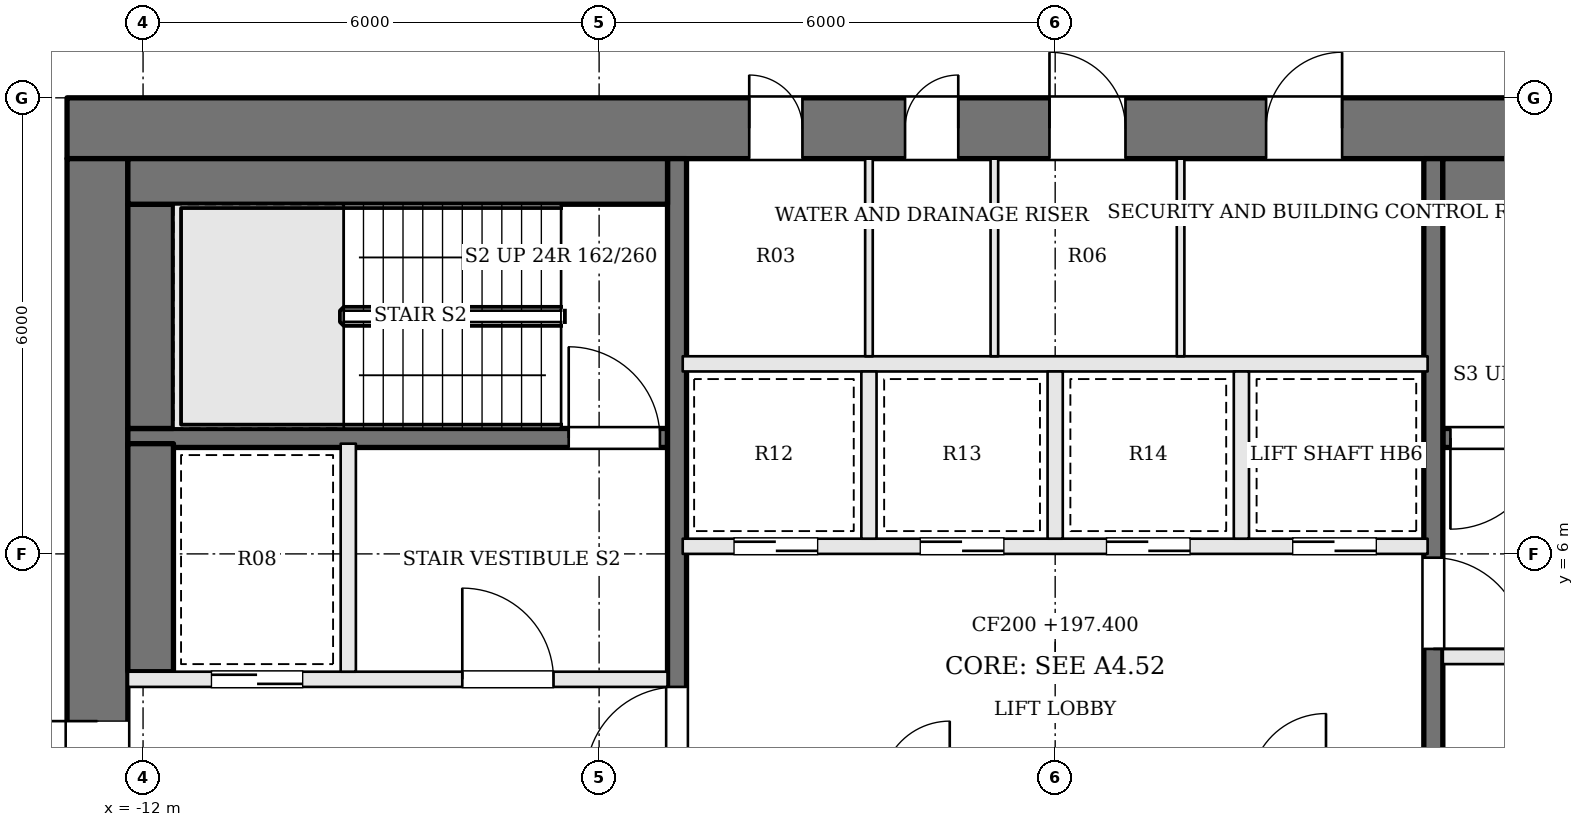
"""IFC4 building model, lengths in metres.
Left out: names, types, materials, properties, quantities, classifications, styles, units other than length and angle.
Written with IfcOpenShell. Run it as: python <this file> out.ifc"""

import sys

from ifc_helpers import new_model, si_unit, direction, frame, frame_2d, origin, place, context, subcontext, project, spatial, rectangle, extrude, element, fill, save


model = new_model("IFC4")
c1 = context("Model", 3, precision=1e-05, world=origin(), true_north=direction((0.0, 1.0)))
c2 = subcontext(c1, "Body", "Model", "MODEL_VIEW")
j1 = project(units=[si_unit("LENGTHUNIT", "METRE"), si_unit("PLANEANGLEUNIT", "RADIAN")], contexts=[c1])
p1 = place(None, origin())
s1 = spatial("IfcSite", under=j1, at=p1, CompositionType="ELEMENT")
p2 = place(p1, origin())
s2 = spatial("IfcBuilding", under=s1, at=p2, CompositionType="ELEMENT")
p3 = place(p2, frame((0.0, 0.0, 197.4)))
s3 = spatial("IfcBuildingStorey", under=s2, at=p3, CompositionType="ELEMENT", Elevation=197.4)
p4 = place(p3, frame((-13.0, 11.6, 0.0), z_axis=(0.0, 0.0, 1.0), x_axis=(1.0, 0.0, 0.0)))
e1 = element("IfcWall", 1, at=p4, inside=s3, PredefinedType="SHEAR", context=c2, shape_type="SweptSolid", body=[
    extrude(rectangle(XDim=26.0, YDim=0.8, at=frame_2d((13.0, 0.0))), origin(), (0.0, 0.0, 1.0), 3.9),
])
p5 = place(p4, frame((8.975, 0.0, 0.0)))
e2 = element("IfcOpeningElement", 2, at=p5, cuts=e1, PredefinedType="OPENING", context=c2, shape_type="SweptSolid", body=[
    extrude(rectangle(XDim=0.7, YDim=2.1, at=frame_2d((0.35, 1.05))), frame((0.0, 0.41, 0.0), z_axis=(0.0, -1.0, 0.0), x_axis=(1.0, 0.0, 0.0)), (0.0, 0.0, 1.0), 0.82),
])
p6 = place(p4, frame((11.025, 0.0, 0.0)))
e3 = element("IfcOpeningElement", 3, at=p6, cuts=e1, PredefinedType="OPENING", context=c2, shape_type="SweptSolid", body=[
    extrude(rectangle(XDim=0.7, YDim=2.1, at=frame_2d((0.35, 1.05))), frame((0.0, 0.41, 0.0), z_axis=(0.0, -1.0, 0.0), x_axis=(1.0, 0.0, 0.0)), (0.0, 0.0, 1.0), 0.82),
])
p7 = place(p4, frame((12.925, 0.0, 0.0)))
e4 = element("IfcOpeningElement", 4, at=p7, cuts=e1, PredefinedType="OPENING", context=c2, shape_type="SweptSolid", body=[
    extrude(rectangle(XDim=1.0, YDim=2.1, at=frame_2d((0.5, 1.05))), frame((0.0, 0.41, 0.0), z_axis=(0.0, -1.0, 0.0), x_axis=(1.0, 0.0, 0.0)), (0.0, 0.0, 1.0), 0.82),
])
p8 = place(p4, frame((15.775, 0.0, 0.0)))
e5 = element("IfcOpeningElement", 5, at=p8, cuts=e1, PredefinedType="OPENING", context=c2, shape_type="SweptSolid", body=[
    extrude(rectangle(XDim=1.0, YDim=2.1, at=frame_2d((0.5, 1.05))), frame((0.0, 0.41, 0.0), z_axis=(0.0, -1.0, 0.0), x_axis=(1.0, 0.0, 0.0)), (0.0, 0.0, 1.0), 0.82),
])
p9 = place(p3, frame((-12.6, -2.2, 0.0), z_axis=(0.0, 0.0, 1.0), x_axis=(0.0, 1.0, 0.0)))
e6 = element("IfcWall", 6, at=p9, inside=s3, PredefinedType="SHEAR", context=c2, shape_type="SweptSolid", body=[
    extrude(rectangle(XDim=13.4, YDim=0.8, at=frame_2d((6.7, 0.0))), origin(), (0.0, 0.0, 1.0), 3.9),
])
p10 = place(p9, frame((4.2, 0.0, 0.0)))
e7 = element("IfcOpeningElement", 7, at=p10, cuts=e6, PredefinedType="OPENING", context=c2, shape_type="SweptSolid", body=[
    extrude(rectangle(XDim=1.8, YDim=2.1, at=frame_2d((0.9, 1.05))), frame((0.0, 0.41, 0.0), z_axis=(0.0, -1.0, 0.0), x_axis=(1.0, 0.0, 0.0)), (0.0, 0.0, 1.0), 0.82),
])
p11 = place(p3, frame((12.2, 7.525, 0.0), z_axis=(0.0, 0.0, 1.0), x_axis=(-1.0, 0.0, 0.0)))
e8 = element("IfcWall", 8, at=p11, inside=s3, PredefinedType="SOLIDWALL", context=c2, shape_type="SweptSolid", body=[
    extrude(rectangle(XDim=7.1, YDim=0.25, at=frame_2d((3.55, 0.0))), origin(), (0.0, 0.0, 1.0), 3.7),
])
p12 = place(p11, frame((5.8, 0.0, 0.0)))
e9 = element("IfcOpeningElement", 9, at=p12, cuts=e8, PredefinedType="OPENING", context=c2, shape_type="SweptSolid", body=[
    extrude(rectangle(XDim=1.2, YDim=2.1, at=frame_2d((0.6, 1.05))), frame((0.0, 0.135, 0.0), z_axis=(0.0, -1.0, 0.0), x_axis=(1.0, 0.0, 0.0)), (0.0, 0.0, 1.0), 0.27),
])
p13 = place(p3, frame((-12.2, 4.35, 0.0), z_axis=(0.0, 0.0, 1.0), x_axis=(1.0, 0.0, 0.0)))
e10 = element("IfcWall", 10, at=p13, inside=s3, PredefinedType="SOLIDWALL", context=c2, shape_type="SweptSolid", body=[
    extrude(rectangle(XDim=7.1, YDim=0.2, at=frame_2d((3.55, 0.0))), origin(), (0.0, 0.0, 1.0), 3.7),
])
p14 = place(p13, frame((4.4, 0.0, 0.0)))
e11 = element("IfcOpeningElement", 11, at=p14, cuts=e10, PredefinedType="OPENING", context=c2, shape_type="SweptSolid", body=[
    extrude(rectangle(XDim=1.2, YDim=2.1, at=frame_2d((0.6, 1.05))), frame((0.0, 0.11, 0.0), z_axis=(0.0, -1.0, 0.0), x_axis=(1.0, 0.0, 0.0)), (0.0, 0.0, 1.0), 0.22),
])
p15 = place(p13, frame((1.1, 0.0, 0.0)))
e12 = element("IfcOpeningElement", 12, at=p15, cuts=e10, PredefinedType="OPENING", context=c2, shape_type="SweptSolid", body=[
    extrude(rectangle(XDim=1.2, YDim=2.1, at=frame_2d((0.6, 1.05))), frame((0.0, 0.11, 0.0), z_axis=(0.0, -1.0, 0.0), x_axis=(1.0, 0.0, 0.0)), (0.0, 0.0, 1.0), 0.22),
])
p16 = place(p3, frame((12.2, 4.65, 0.0), z_axis=(0.0, 0.0, 1.0), x_axis=(-1.0, 0.0, 0.0)))
e13 = element("IfcWall", 13, at=p16, inside=s3, PredefinedType="SOLIDWALL", context=c2, shape_type="SweptSolid", body=[
    extrude(rectangle(XDim=7.1, YDim=0.2, at=frame_2d((3.55, 0.0))), origin(), (0.0, 0.0, 1.0), 3.7),
])
p17 = place(p16, frame((4.4, 0.0, 0.0)))
e14 = element("IfcOpeningElement", 14, at=p17, cuts=e13, PredefinedType="OPENING", context=c2, shape_type="SweptSolid", body=[
    extrude(rectangle(XDim=1.2, YDim=2.1, at=frame_2d((0.6, 1.05))), frame((0.0, 0.11, 0.0), z_axis=(0.0, -1.0, 0.0), x_axis=(1.0, 0.0, 0.0)), (0.0, 0.0, 1.0), 0.22),
])
p18 = place(p16, frame((1.1, 0.0, 0.0)))
e15 = element("IfcOpeningElement", 15, at=p18, cuts=e13, PredefinedType="OPENING", context=c2, shape_type="SweptSolid", body=[
    extrude(rectangle(XDim=1.2, YDim=2.1, at=frame_2d((0.6, 1.05))), frame((0.0, 0.11, 0.0), z_axis=(0.0, -1.0, 0.0), x_axis=(1.0, 0.0, 0.0)), (0.0, 0.0, 1.0), 0.22),
])
p19 = place(p3, frame((-12.2, 7.525, 0.0), z_axis=(0.0, 0.0, 1.0), x_axis=(1.0, 0.0, 0.0)))
e16 = element("IfcWall", 16, at=p19, inside=s3, PredefinedType="SOLIDWALL", context=c2, shape_type="SweptSolid", body=[
    extrude(rectangle(XDim=7.1, YDim=0.25, at=frame_2d((3.55, 0.0))), origin(), (0.0, 0.0, 1.0), 3.7),
])
p20 = place(p19, frame((5.8, 0.0, 0.0)))
e17 = element("IfcOpeningElement", 17, at=p20, cuts=e16, PredefinedType="OPENING", context=c2, shape_type="SweptSolid", body=[
    extrude(rectangle(XDim=1.2, YDim=2.1, at=frame_2d((0.6, 1.05))), frame((0.0, 0.135, 0.0), z_axis=(0.0, -1.0, 0.0), x_axis=(1.0, 0.0, 0.0)), (0.0, 0.0, 1.0), 0.27),
])
p21 = place(p3, frame((-9.3, 4.45, 0.0), z_axis=(0.0, 0.0, 1.0), x_axis=(0.0, 1.0, 0.0)))
e18 = element("IfcWall", 18, at=p21, inside=s3, PredefinedType="SOLIDWALL", context=c2, shape_type="SweptSolid", body=[
    extrude(rectangle(XDim=3.0, YDim=0.2, at=frame_2d((1.5, 0.0))), origin(), (0.0, 0.0, 1.0), 3.7),
])
p22 = place(p3, frame((-4.975, -2.2, 0.0), z_axis=(0.0, 0.0, 1.0), x_axis=(0.0, 1.0, 0.0)))
e19 = element("IfcWall", 19, at=p22, inside=s3, PredefinedType="SOLIDWALL", context=c2, shape_type="SweptSolid", body=[
    extrude(rectangle(XDim=13.4, YDim=0.25, at=frame_2d((6.7, 0.0))), origin(), (0.0, 0.0, 1.0), 3.7),
])
p23 = place(p22, frame((5.25, 0.0, 0.0)))
e20 = element("IfcOpeningElement", 20, at=p23, cuts=e19, PredefinedType="OPENING", context=c2, shape_type="SweptSolid", body=[
    extrude(rectangle(XDim=1.2, YDim=2.1, at=frame_2d((0.6, 1.05))), frame((0.0, 0.135, 0.0), z_axis=(0.0, -1.0, 0.0), x_axis=(1.0, 0.0, 0.0)), (0.0, 0.0, 1.0), 0.27),
])
p24 = place(p3, frame((4.975, 11.2, 0.0), z_axis=(0.0, 0.0, 1.0), x_axis=(0.0, -1.0, 0.0)))
e21 = element("IfcWall", 21, at=p24, inside=s3, PredefinedType="SOLIDWALL", context=c2, shape_type="SweptSolid", body=[
    extrude(rectangle(XDim=13.4, YDim=0.25, at=frame_2d((6.7, 0.0))), origin(), (0.0, 0.0, 1.0), 3.7),
])
p25 = place(p24, frame((5.25, 0.0, 0.0)))
e22 = element("IfcOpeningElement", 22, at=p25, cuts=e21, PredefinedType="OPENING", context=c2, shape_type="SweptSolid", body=[
    extrude(rectangle(XDim=1.2, YDim=2.1, at=frame_2d((0.6, 1.05))), frame((0.0, 0.135, 0.0), z_axis=(0.0, -1.0, 0.0), x_axis=(1.0, 0.0, 0.0)), (0.0, 0.0, 1.0), 0.27),
])
p26 = place(p3, frame((-11.9, 4.45, 0.0), z_axis=(0.0, 0.0, 1.0), x_axis=(0.0, 1.0, 0.0)))
e23 = element("IfcWall", 23, at=p26, inside=s3, PredefinedType="SOLIDWALL", context=c2, shape_type="SweptSolid", body=[
    extrude(rectangle(XDim=3.0, YDim=0.6, at=frame_2d((1.5, 0.0))), origin(), (0.0, 0.0, 1.0), 3.7),
])
p27 = place(p3, frame((-11.9, 7.65, 0.0), z_axis=(0.0, 0.0, 1.0), x_axis=(0.0, 1.0, 0.0)))
e24 = element("IfcWall", 24, at=p27, inside=s3, PredefinedType="SOLIDWALL", context=c2, shape_type="SweptSolid", body=[
    extrude(rectangle(XDim=2.95, YDim=0.6, at=frame_2d((1.475, 0.0))), origin(), (0.0, 0.0, 1.0), 3.7),
])
for number, where, z_axis, x_axis in (
    (25, (-12.2, 10.9, 0.0), (0.0, 0.0, 1.0), (1.0, 0.0, 0.0)),
    (26, (12.2, 10.9, 0.0), (0.0, 0.0, 1.0), (-1.0, 0.0, 0.0)),
):
    element("IfcWall", number, at=place(p3, frame(where, z_axis=z_axis, x_axis=x_axis)), inside=s3, PredefinedType="SOLIDWALL", context=c2, shape_type="SweptSolid", body=[
        extrude(rectangle(XDim=7.1, YDim=0.6, at=frame_2d((3.55, 0.0))), origin(), (0.0, 0.0, 1.0), 3.7),
    ])
p28 = place(p3, frame((-4.9, 6.1, 0.0), z_axis=(0.0, 0.0, 1.0), x_axis=(1.0, 0.0, 0.0)))
e27 = element("IfcWall", 27, at=p28, inside=s3, PredefinedType="SOLIDWALL", context=c2, shape_type="SweptSolid", body=[
    extrude(rectangle(XDim=9.8, YDim=0.2, at=frame_2d((4.9, 0.0))), origin(), (0.0, 0.0, 1.0), 3.7),
])
p29 = place(p28, frame((0.675, 0.0, 0.0)))
e28 = element("IfcOpeningElement", 28, at=p29, cuts=e27, PredefinedType="OPENING", context=c2, shape_type="SweptSolid", body=[
    extrude(rectangle(XDim=1.1, YDim=2.1, at=frame_2d((0.55, 1.05))), frame((0.0, 0.11, 0.0), z_axis=(0.0, -1.0, 0.0), x_axis=(1.0, 0.0, 0.0)), (0.0, 0.0, 1.0), 0.22),
])
p30 = place(p28, frame((3.125, 0.0, 0.0)))
e29 = element("IfcOpeningElement", 29, at=p30, cuts=e27, PredefinedType="OPENING", context=c2, shape_type="SweptSolid", body=[
    extrude(rectangle(XDim=1.1, YDim=2.1, at=frame_2d((0.55, 1.05))), frame((0.0, 0.11, 0.0), z_axis=(0.0, -1.0, 0.0), x_axis=(1.0, 0.0, 0.0)), (0.0, 0.0, 1.0), 0.22),
])
p31 = place(p28, frame((5.575, 0.0, 0.0)))
e30 = element("IfcOpeningElement", 30, at=p31, cuts=e27, PredefinedType="OPENING", context=c2, shape_type="SweptSolid", body=[
    extrude(rectangle(XDim=1.1, YDim=2.1, at=frame_2d((0.55, 1.05))), frame((0.0, 0.11, 0.0), z_axis=(0.0, -1.0, 0.0), x_axis=(1.0, 0.0, 0.0)), (0.0, 0.0, 1.0), 0.22),
])
p32 = place(p28, frame((8.025, 0.0, 0.0)))
e31 = element("IfcOpeningElement", 31, at=p32, cuts=e27, PredefinedType="OPENING", context=c2, shape_type="SweptSolid", body=[
    extrude(rectangle(XDim=1.1, YDim=2.1, at=frame_2d((0.55, 1.05))), frame((0.0, 0.11, 0.0), z_axis=(0.0, -1.0, 0.0), x_axis=(1.0, 0.0, 0.0)), (0.0, 0.0, 1.0), 0.22),
])
p33 = place(p3, frame((-4.9, 8.5, 0.0), z_axis=(0.0, 0.0, 1.0), x_axis=(1.0, 0.0, 0.0)))
e32 = element("IfcWall", 32, at=p33, inside=s3, PredefinedType="SOLIDWALL", context=c2, shape_type="SweptSolid", body=[
    extrude(rectangle(XDim=9.8, YDim=0.2, at=frame_2d((4.9, 0.0))), origin(), (0.0, 0.0, 1.0), 3.7),
])
for number, where, z_axis, x_axis in (
    (33, (-2.45, 6.2, 0.0), (0.0, 0.0, 1.0), (0.0, 1.0, 0.0)),
    (34, (0.0, 6.2, 0.0), (0.0, 0.0, 1.0), (0.0, 1.0, 0.0)),
    (35, (2.45, 6.2, 0.0), (0.0, 0.0, 1.0), (0.0, 1.0, 0.0)),
):
    element("IfcWall", number, at=place(p3, frame(where, z_axis=z_axis, x_axis=x_axis)), inside=s3, PredefinedType="SOLIDWALL", context=c2, shape_type="SweptSolid", body=[
        extrude(rectangle(XDim=2.2, YDim=0.2, at=frame_2d((1.1, 0.0))), origin(), (0.0, 0.0, 1.0), 3.7),
    ])
for number, where, z_axis, x_axis in (
    (36, (-2.45, 8.6, 0.0), (0.0, 0.0, 1.0), (0.0, 1.0, 0.0)),
    (37, (-0.8, 8.6, 0.0), (0.0, 0.0, 1.0), (0.0, 1.0, 0.0)),
    (38, (1.65, 8.6, 0.0), (0.0, 0.0, 1.0), (0.0, 1.0, 0.0)),
):
    element("IfcWall", number, at=place(p3, frame(where, z_axis=z_axis, x_axis=x_axis)), inside=s3, PredefinedType="PARTITIONING", context=c2, shape_type="SweptSolid", body=[
        extrude(rectangle(XDim=2.6, YDim=0.1, at=frame_2d((1.3, 0.0))), origin(), (0.0, 0.0, 1.0), 3.7),
    ])
p34 = place(p10, origin())
e39 = element("IfcDoor", 39, at=p34, inside=s3, OperationType="DOUBLE_DOOR_SINGLE_SWING", PredefinedType="DOOR", context=c2, shape_type="SweptSolid", body=[
    extrude(rectangle(XDim=1.8, YDim=2.1, at=frame_2d((0.9, 1.05))), frame((0.0, 0.025, 0.0), z_axis=(0.0, -1.0, 0.0), x_axis=(1.0, 0.0, 0.0)), (0.0, 0.0, 1.0), 0.05),
])
fill(e7, e39)
p35 = place(p23, origin())
e40 = element("IfcDoor", 40, at=p35, inside=s3, OperationType="SINGLE_SWING_LEFT", PredefinedType="DOOR", context=c2, shape_type="SweptSolid", body=[
    extrude(rectangle(XDim=1.2, YDim=2.1, at=frame_2d((0.6, 1.05))), frame((0.0, 0.025, 0.0), z_axis=(0.0, -1.0, 0.0), x_axis=(1.0, 0.0, 0.0)), (0.0, 0.0, 1.0), 0.05),
])
fill(e20, e40)
p36 = place(p25, origin())
e41 = element("IfcDoor", 41, at=p36, inside=s3, OperationType="SINGLE_SWING_RIGHT", PredefinedType="DOOR", context=c2, shape_type="SweptSolid", body=[
    extrude(rectangle(XDim=1.2, YDim=2.1, at=frame_2d((0.6, 1.05))), frame((0.0, 0.025, 0.0), z_axis=(0.0, -1.0, 0.0), x_axis=(1.0, 0.0, 0.0)), (0.0, 0.0, 1.0), 0.05),
])
fill(e22, e41)
p37 = place(p14, origin())
e42 = element("IfcDoor", 42, at=p37, inside=s3, OperationType="SINGLE_SWING_LEFT", PredefinedType="DOOR", context=c2, shape_type="SweptSolid", body=[
    extrude(rectangle(XDim=1.2, YDim=2.1, at=frame_2d((0.6, 1.05))), frame((0.0, 0.025, 0.0), z_axis=(0.0, -1.0, 0.0), x_axis=(1.0, 0.0, 0.0)), (0.0, 0.0, 1.0), 0.05),
])
fill(e11, e42)
p38 = place(p12, origin())
e43 = element("IfcDoor", 43, at=p38, inside=s3, OperationType="SINGLE_SWING_RIGHT", PredefinedType="DOOR", context=c2, shape_type="SweptSolid", body=[
    extrude(rectangle(XDim=1.2, YDim=2.1, at=frame_2d((0.6, 1.05))), frame((0.0, 0.025, 0.0), z_axis=(0.0, -1.0, 0.0), x_axis=(1.0, 0.0, 0.0)), (0.0, 0.0, 1.0), 0.05),
])
fill(e9, e43)
p39 = place(p20, origin())
e44 = element("IfcDoor", 44, at=p39, inside=s3, OperationType="SINGLE_SWING_LEFT", PredefinedType="DOOR", context=c2, shape_type="SweptSolid", body=[
    extrude(rectangle(XDim=1.2, YDim=2.1, at=frame_2d((0.6, 1.05))), frame((0.0, 0.025, 0.0), z_axis=(0.0, -1.0, 0.0), x_axis=(1.0, 0.0, 0.0)), (0.0, 0.0, 1.0), 0.05),
])
fill(e17, e44)
p40 = place(p15, origin())
e45 = element("IfcDoor", 45, at=p40, inside=s3, OperationType="SLIDING_TO_RIGHT", PredefinedType="DOOR", context=c2, shape_type="SweptSolid", body=[
    extrude(rectangle(XDim=1.2, YDim=2.1, at=frame_2d((0.6, 1.05))), frame((0.0, 0.025, 0.0), z_axis=(0.0, -1.0, 0.0), x_axis=(1.0, 0.0, 0.0)), (0.0, 0.0, 1.0), 0.05),
])
fill(e12, e45)
p41 = place(p29, origin())
e46 = element("IfcDoor", 46, at=p41, inside=s3, OperationType="SLIDING_TO_RIGHT", PredefinedType="DOOR", context=c2, shape_type="SweptSolid", body=[
    extrude(rectangle(XDim=1.1, YDim=2.1, at=frame_2d((0.55, 1.05))), frame((0.0, 0.025, 0.0), z_axis=(0.0, -1.0, 0.0), x_axis=(1.0, 0.0, 0.0)), (0.0, 0.0, 1.0), 0.05),
])
fill(e28, e46)
p42 = place(p30, origin())
e47 = element("IfcDoor", 47, at=p42, inside=s3, OperationType="SLIDING_TO_LEFT", PredefinedType="DOOR", context=c2, shape_type="SweptSolid", body=[
    extrude(rectangle(XDim=1.1, YDim=2.1, at=frame_2d((0.55, 1.05))), frame((0.0, 0.025, 0.0), z_axis=(0.0, -1.0, 0.0), x_axis=(1.0, 0.0, 0.0)), (0.0, 0.0, 1.0), 0.05),
])
fill(e29, e47)
p43 = place(p31, origin())
e48 = element("IfcDoor", 48, at=p43, inside=s3, OperationType="SLIDING_TO_RIGHT", PredefinedType="DOOR", context=c2, shape_type="SweptSolid", body=[
    extrude(rectangle(XDim=1.1, YDim=2.1, at=frame_2d((0.55, 1.05))), frame((0.0, 0.025, 0.0), z_axis=(0.0, -1.0, 0.0), x_axis=(1.0, 0.0, 0.0)), (0.0, 0.0, 1.0), 0.05),
])
fill(e30, e48)
p44 = place(p32, origin())
e49 = element("IfcDoor", 49, at=p44, inside=s3, OperationType="SLIDING_TO_LEFT", PredefinedType="DOOR", context=c2, shape_type="SweptSolid", body=[
    extrude(rectangle(XDim=1.1, YDim=2.1, at=frame_2d((0.55, 1.05))), frame((0.0, 0.025, 0.0), z_axis=(0.0, -1.0, 0.0), x_axis=(1.0, 0.0, 0.0)), (0.0, 0.0, 1.0), 0.05),
])
fill(e31, e49)
p45 = place(p5, origin())
e50 = element("IfcDoor", 50, at=p45, inside=s3, OperationType="SINGLE_SWING_LEFT", PredefinedType="DOOR", context=c2, shape_type="SweptSolid", body=[
    extrude(rectangle(XDim=0.7, YDim=2.1, at=frame_2d((0.35, 1.05))), frame((0.0, 0.025, 0.0), z_axis=(0.0, -1.0, 0.0), x_axis=(1.0, 0.0, 0.0)), (0.0, 0.0, 1.0), 0.05),
])
fill(e2, e50)
p46 = place(p6, origin())
e51 = element("IfcDoor", 51, at=p46, inside=s3, OperationType="SINGLE_SWING_RIGHT", PredefinedType="DOOR", context=c2, shape_type="SweptSolid", body=[
    extrude(rectangle(XDim=0.7, YDim=2.1, at=frame_2d((0.35, 1.05))), frame((0.0, 0.025, 0.0), z_axis=(0.0, -1.0, 0.0), x_axis=(1.0, 0.0, 0.0)), (0.0, 0.0, 1.0), 0.05),
])
fill(e3, e51)
p47 = place(p7, origin())
e52 = element("IfcDoor", 52, at=p47, inside=s3, OperationType="SINGLE_SWING_LEFT", PredefinedType="DOOR", context=c2, shape_type="SweptSolid", body=[
    extrude(rectangle(XDim=1.0, YDim=2.1, at=frame_2d((0.5, 1.05))), frame((0.0, 0.025, 0.0), z_axis=(0.0, -1.0, 0.0), x_axis=(1.0, 0.0, 0.0)), (0.0, 0.0, 1.0), 0.05),
])
fill(e4, e52)
p48 = place(p8, origin())
e53 = element("IfcDoor", 53, at=p48, inside=s3, OperationType="SINGLE_SWING_RIGHT", PredefinedType="DOOR", context=c2, shape_type="SweptSolid", body=[
    extrude(rectangle(XDim=1.0, YDim=2.1, at=frame_2d((0.5, 1.05))), frame((0.0, 0.025, 0.0), z_axis=(0.0, -1.0, 0.0), x_axis=(1.0, 0.0, 0.0)), (0.0, 0.0, 1.0), 0.05),
])
fill(e5, e53)
save(model, sys.argv[1])
